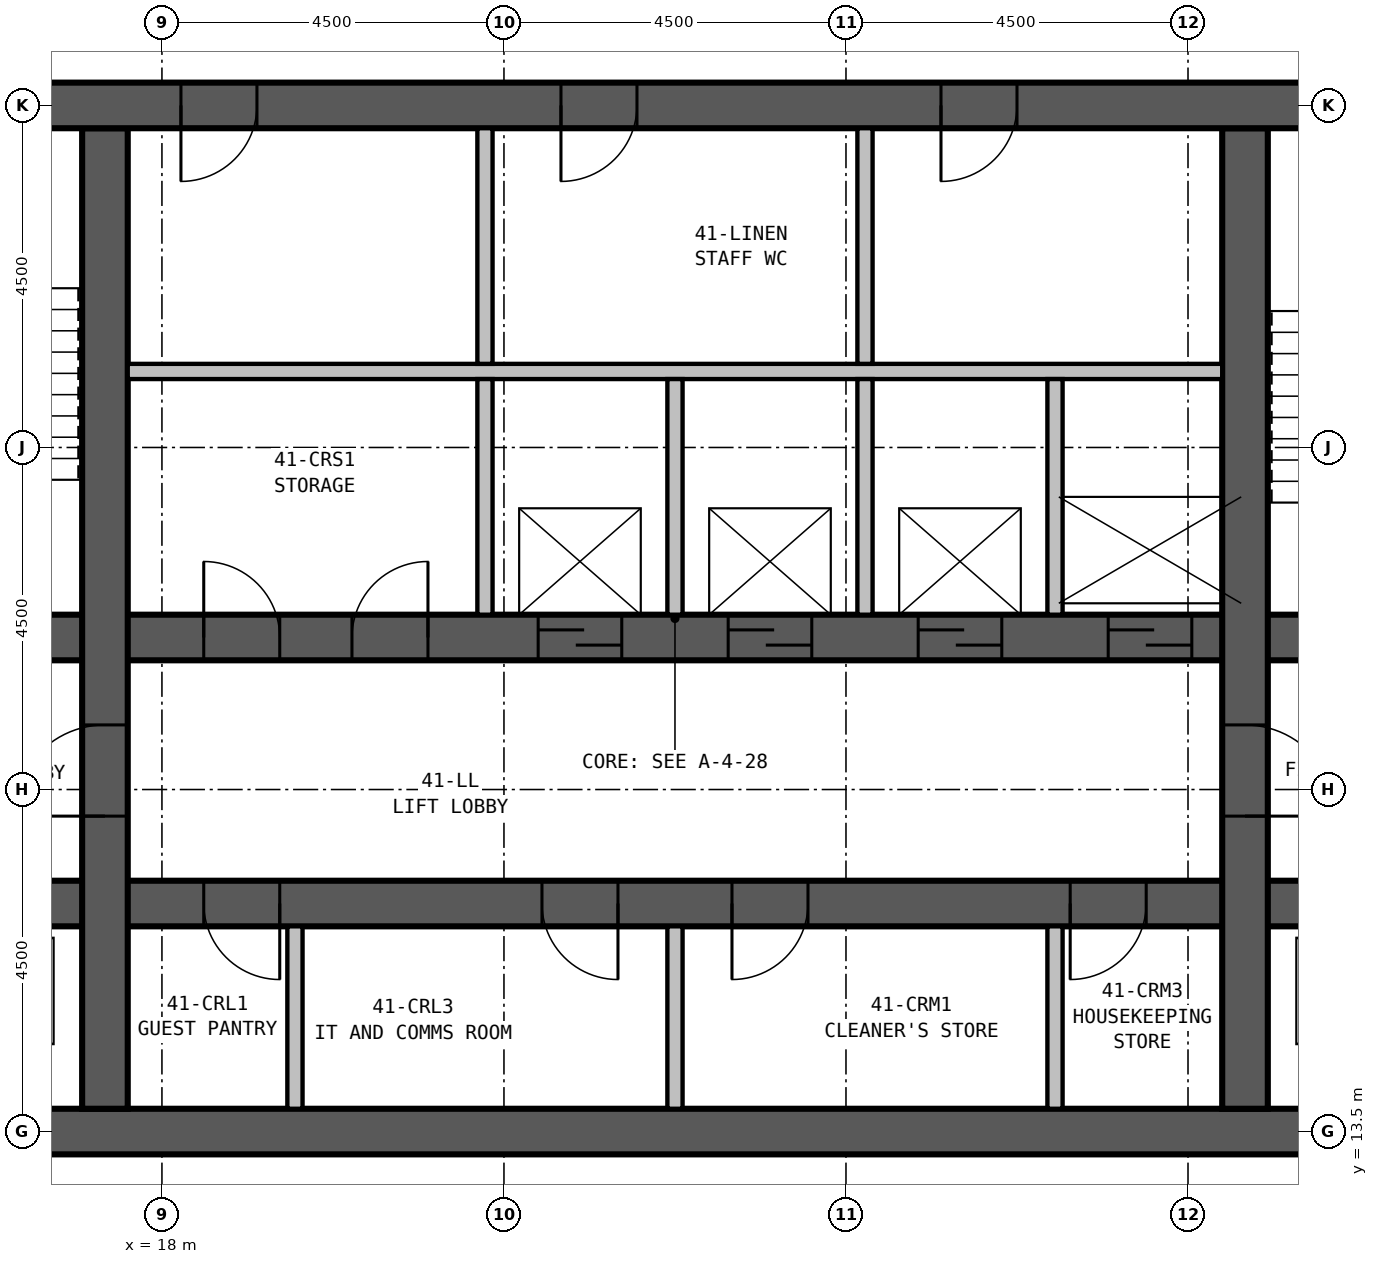
"""IFC4 building model, lengths in metres.
Left out: names, types, materials, properties, quantities, classifications, styles, units other than length and angle.
Written with IfcOpenShell. Run it as: python <this file> out.ifc"""

import sys

from ifc_helpers import new_model, si_unit, direction, frame, frame_2d, origin, place, context, subcontext, project, spatial, rectangle, extrude, element, fill, save


model = new_model("IFC4")
c1 = context("Model", 3, precision=1e-05, world=origin(), true_north=direction((0.0, 1.0)))
c2 = subcontext(c1, "Body", "Model", "MODEL_VIEW")
j1 = project(units=[si_unit("LENGTHUNIT", "METRE"), si_unit("PLANEANGLEUNIT", "RADIAN")], contexts=[c1])
p1 = place(None, origin())
s1 = spatial("IfcSite", under=j1, at=p1, CompositionType="ELEMENT")
p2 = place(p1, origin())
s2 = spatial("IfcBuilding", under=s1, at=p2, CompositionType="ELEMENT")
p3 = place(p2, frame((0.0, 0.0, 162.4)))
s3 = spatial("IfcBuildingStorey", under=s2, at=p3, CompositionType="ELEMENT", Elevation=162.4)
p4 = place(p3, frame((13.2, 13.5, 0.0), z_axis=(0.0, 0.0, 1.0), x_axis=(1.0, 0.0, 0.0)))
e1 = element("IfcWall", 1, at=p4, inside=s3, PredefinedType="SHEAR", context=c2, shape_type="SweptSolid", body=[
    extrude(rectangle(XDim=23.1, YDim=0.6, at=frame_2d((11.55, 0.0))), origin(), (0.0, 0.0, 1.0), 3.5),
])
p5 = place(p3, frame((36.3, 27.0, 0.0), z_axis=(0.0, 0.0, 1.0), x_axis=(-1.0, 0.0, 0.0)))
e2 = element("IfcWall", 2, at=p5, inside=s3, PredefinedType="SHEAR", context=c2, shape_type="SweptSolid", body=[
    extrude(rectangle(XDim=23.1, YDim=0.6, at=frame_2d((11.55, 0.0))), origin(), (0.0, 0.0, 1.0), 3.5),
])
p6 = place(p5, frame((17.05, 0.0, 0.0)))
e3 = element("IfcOpeningElement", 3, at=p6, cuts=e2, PredefinedType="OPENING", context=c2, shape_type="SweptSolid", body=[
    extrude(rectangle(XDim=1.0, YDim=2.1, at=frame_2d((0.5, 1.05))), frame((0.0, 0.31, 0.0), z_axis=(0.0, -1.0, 0.0), x_axis=(1.0, 0.0, 0.0)), (0.0, 0.0, 1.0), 0.62),
])
p7 = place(p5, frame((12.05, 0.0, 0.0)))
e4 = element("IfcOpeningElement", 4, at=p7, cuts=e2, PredefinedType="OPENING", context=c2, shape_type="SweptSolid", body=[
    extrude(rectangle(XDim=1.0, YDim=2.1, at=frame_2d((0.5, 1.05))), frame((0.0, 0.31, 0.0), z_axis=(0.0, -1.0, 0.0), x_axis=(1.0, 0.0, 0.0)), (0.0, 0.0, 1.0), 0.62),
])
p8 = place(p5, frame((7.05, 0.0, 0.0)))
e5 = element("IfcOpeningElement", 5, at=p8, cuts=e2, PredefinedType="OPENING", context=c2, shape_type="SweptSolid", body=[
    extrude(rectangle(XDim=1.0, YDim=2.1, at=frame_2d((0.5, 1.05))), frame((0.0, 0.31, 0.0), z_axis=(0.0, -1.0, 0.0), x_axis=(1.0, 0.0, 0.0)), (0.0, 0.0, 1.0), 0.62),
])
p9 = place(p3, frame((17.25, 13.8, 0.0), z_axis=(0.0, 0.0, 1.0), x_axis=(0.0, 1.0, 0.0)))
e6 = element("IfcWall", 6, at=p9, inside=s3, PredefinedType="SHEAR", context=c2, shape_type="SweptSolid", body=[
    extrude(rectangle(XDim=12.9, YDim=0.6, at=frame_2d((6.45, 0.0))), origin(), (0.0, 0.0, 1.0), 3.5),
])
p10 = place(p9, frame((3.85, 0.0, 0.0)))
e7 = element("IfcOpeningElement", 7, at=p10, cuts=e6, PredefinedType="OPENING", context=c2, shape_type="SweptSolid", body=[
    extrude(rectangle(XDim=1.2, YDim=2.1, at=frame_2d((0.6, 1.05))), frame((0.0, 0.31, 0.0), z_axis=(0.0, -1.0, 0.0), x_axis=(1.0, 0.0, 0.0)), (0.0, 0.0, 1.0), 0.62),
])
p11 = place(p3, frame((32.25, 13.8, 0.0), z_axis=(0.0, 0.0, 1.0), x_axis=(0.0, 1.0, 0.0)))
e8 = element("IfcWall", 8, at=p11, inside=s3, PredefinedType="SHEAR", context=c2, shape_type="SweptSolid", body=[
    extrude(rectangle(XDim=12.9, YDim=0.6, at=frame_2d((6.45, 0.0))), origin(), (0.0, 0.0, 1.0), 3.5),
])
p12 = place(p11, frame((5.05, 0.0, 0.0), z_axis=(0.0, 0.0, 1.0), x_axis=(-1.0, 0.0, 0.0)))
e9 = element("IfcOpeningElement", 9, at=p12, cuts=e8, PredefinedType="OPENING", context=c2, shape_type="SweptSolid", body=[
    extrude(rectangle(XDim=1.2, YDim=2.1, at=frame_2d((0.6, 1.05))), frame((0.0, 0.31, 0.0), z_axis=(0.0, -1.0, 0.0), x_axis=(1.0, 0.0, 0.0)), (0.0, 0.0, 1.0), 0.62),
])
p13 = place(p3, frame((13.8, 16.5, 0.0), z_axis=(0.0, 0.0, 1.0), x_axis=(1.0, 0.0, 0.0)))
e10 = element("IfcWall", 10, at=p13, inside=s3, PredefinedType="SHEAR", context=c2, shape_type="SweptSolid", body=[
    extrude(rectangle(XDim=21.9, YDim=0.6, at=frame_2d((10.95, 0.0))), origin(), (0.0, 0.0, 1.0), 3.5),
])
p14 = place(p13, frame((5.75, 0.0, 0.0), z_axis=(0.0, 0.0, 1.0), x_axis=(-1.0, 0.0, 0.0)))
e11 = element("IfcOpeningElement", 11, at=p14, cuts=e10, PredefinedType="OPENING", context=c2, shape_type="SweptSolid", body=[
    extrude(rectangle(XDim=1.0, YDim=2.1, at=frame_2d((0.5, 1.05))), frame((0.0, 0.31, 0.0), z_axis=(0.0, -1.0, 0.0), x_axis=(1.0, 0.0, 0.0)), (0.0, 0.0, 1.0), 0.62),
])
p15 = place(p13, frame((10.2, 0.0, 0.0), z_axis=(0.0, 0.0, 1.0), x_axis=(-1.0, 0.0, 0.0)))
e12 = element("IfcOpeningElement", 12, at=p15, cuts=e10, PredefinedType="OPENING", context=c2, shape_type="SweptSolid", body=[
    extrude(rectangle(XDim=1.0, YDim=2.1, at=frame_2d((0.5, 1.05))), frame((0.0, 0.31, 0.0), z_axis=(0.0, -1.0, 0.0), x_axis=(1.0, 0.0, 0.0)), (0.0, 0.0, 1.0), 0.62),
])
p16 = place(p13, frame((12.7, 0.0, 0.0), z_axis=(0.0, 0.0, 1.0), x_axis=(-1.0, 0.0, 0.0)))
e13 = element("IfcOpeningElement", 13, at=p16, cuts=e10, PredefinedType="OPENING", context=c2, shape_type="SweptSolid", body=[
    extrude(rectangle(XDim=1.0, YDim=2.1, at=frame_2d((0.5, 1.05))), frame((0.0, 0.31, 0.0), z_axis=(0.0, -1.0, 0.0), x_axis=(1.0, 0.0, 0.0)), (0.0, 0.0, 1.0), 0.62),
])
p17 = place(p13, frame((17.15, 0.0, 0.0), z_axis=(0.0, 0.0, 1.0), x_axis=(-1.0, 0.0, 0.0)))
e14 = element("IfcOpeningElement", 14, at=p17, cuts=e10, PredefinedType="OPENING", context=c2, shape_type="SweptSolid", body=[
    extrude(rectangle(XDim=1.0, YDim=2.1, at=frame_2d((0.5, 1.05))), frame((0.0, 0.31, 0.0), z_axis=(0.0, -1.0, 0.0), x_axis=(1.0, 0.0, 0.0)), (0.0, 0.0, 1.0), 0.62),
])
p18 = place(p13, frame((0.6, 0.0, 0.0)))
e15 = element("IfcOpeningElement", 15, at=p18, cuts=e10, PredefinedType="OPENING", context=c2, shape_type="SweptSolid", body=[
    extrude(rectangle(XDim=1.2, YDim=2.1, at=frame_2d((0.6, 1.05))), frame((0.0, 0.31, 0.0), z_axis=(0.0, -1.0, 0.0), x_axis=(1.0, 0.0, 0.0)), (0.0, 0.0, 1.0), 0.62),
])
p19 = place(p13, frame((19.6, 0.0, 0.0)))
e16 = element("IfcOpeningElement", 16, at=p19, cuts=e10, PredefinedType="OPENING", context=c2, shape_type="SweptSolid", body=[
    extrude(rectangle(XDim=1.2, YDim=2.1, at=frame_2d((0.6, 1.05))), frame((0.0, 0.31, 0.0), z_axis=(0.0, -1.0, 0.0), x_axis=(1.0, 0.0, 0.0)), (0.0, 0.0, 1.0), 0.62),
])
p20 = place(p3, frame((13.8, 20.0, 0.0), z_axis=(0.0, 0.0, 1.0), x_axis=(1.0, 0.0, 0.0)))
e17 = element("IfcWall", 17, at=p20, inside=s3, PredefinedType="SHEAR", context=c2, shape_type="SweptSolid", body=[
    extrude(rectangle(XDim=21.9, YDim=0.6, at=frame_2d((10.95, 0.0))), origin(), (0.0, 0.0, 1.0), 3.5),
])
p21 = place(p20, frame((0.5, 0.0, 0.0)))
e18 = element("IfcOpeningElement", 18, at=p21, cuts=e17, PredefinedType="OPENING", context=c2, shape_type="SweptSolid", body=[
    extrude(rectangle(XDim=1.0, YDim=2.1, at=frame_2d((0.5, 1.05))), frame((0.0, 0.31, 0.0), z_axis=(0.0, -1.0, 0.0), x_axis=(1.0, 0.0, 0.0)), (0.0, 0.0, 1.0), 0.62),
])
p22 = place(p20, frame((20.5, 0.0, 0.0)))
e19 = element("IfcOpeningElement", 19, at=p22, cuts=e17, PredefinedType="OPENING", context=c2, shape_type="SweptSolid", body=[
    extrude(rectangle(XDim=1.0, YDim=2.1, at=frame_2d((0.5, 1.05))), frame((0.0, 0.31, 0.0), z_axis=(0.0, -1.0, 0.0), x_axis=(1.0, 0.0, 0.0)), (0.0, 0.0, 1.0), 0.62),
])
p23 = place(p20, frame((9.15, 0.0, 0.0)))
e20 = element("IfcOpeningElement", 20, at=p23, cuts=e17, PredefinedType="OPENING", context=c2, shape_type="SweptSolid", body=[
    extrude(rectangle(XDim=1.1, YDim=2.1, at=frame_2d((0.55, 1.05))), frame((0.0, 0.31, 0.0), z_axis=(0.0, -1.0, 0.0), x_axis=(1.0, 0.0, 0.0)), (0.0, 0.0, 1.0), 0.62),
])
p24 = place(p20, frame((11.65, 0.0, 0.0)))
e21 = element("IfcOpeningElement", 21, at=p24, cuts=e17, PredefinedType="OPENING", context=c2, shape_type="SweptSolid", body=[
    extrude(rectangle(XDim=1.1, YDim=2.1, at=frame_2d((0.55, 1.05))), frame((0.0, 0.31, 0.0), z_axis=(0.0, -1.0, 0.0), x_axis=(1.0, 0.0, 0.0)), (0.0, 0.0, 1.0), 0.62),
])
p25 = place(p20, frame((14.15, 0.0, 0.0)))
e22 = element("IfcOpeningElement", 22, at=p25, cuts=e17, PredefinedType="OPENING", context=c2, shape_type="SweptSolid", body=[
    extrude(rectangle(XDim=1.1, YDim=2.1, at=frame_2d((0.55, 1.05))), frame((0.0, 0.31, 0.0), z_axis=(0.0, -1.0, 0.0), x_axis=(1.0, 0.0, 0.0)), (0.0, 0.0, 1.0), 0.62),
])
p26 = place(p20, frame((16.65, 0.0, 0.0)))
e23 = element("IfcOpeningElement", 23, at=p26, cuts=e17, PredefinedType="OPENING", context=c2, shape_type="SweptSolid", body=[
    extrude(rectangle(XDim=1.1, YDim=2.1, at=frame_2d((0.55, 1.05))), frame((0.0, 0.31, 0.0), z_axis=(0.0, -1.0, 0.0), x_axis=(1.0, 0.0, 0.0)), (0.0, 0.0, 1.0), 0.62),
])
p27 = place(p20, frame((4.75, 0.0, 0.0)))
e24 = element("IfcOpeningElement", 24, at=p27, cuts=e17, PredefinedType="OPENING", context=c2, shape_type="SweptSolid", body=[
    extrude(rectangle(XDim=1.0, YDim=2.1, at=frame_2d((0.5, 1.05))), frame((0.0, 0.31, 0.0), z_axis=(0.0, -1.0, 0.0), x_axis=(1.0, 0.0, 0.0)), (0.0, 0.0, 1.0), 0.62),
])
p28 = place(p20, frame((6.7, 0.0, 0.0)))
e25 = element("IfcOpeningElement", 25, at=p28, cuts=e17, PredefinedType="OPENING", context=c2, shape_type="SweptSolid", body=[
    extrude(rectangle(XDim=1.0, YDim=2.1, at=frame_2d((0.5, 1.05))), frame((0.0, 0.31, 0.0), z_axis=(0.0, -1.0, 0.0), x_axis=(1.0, 0.0, 0.0)), (0.0, 0.0, 1.0), 0.62),
])
p29 = place(p3, frame((19.75, 13.8, 0.0), z_axis=(0.0, 0.0, 1.0), x_axis=(0.0, 1.0, 0.0)))
e26 = element("IfcWall", 26, at=p29, inside=s3, PredefinedType="PARTITIONING", context=c2, shape_type="SweptSolid", body=[
    extrude(rectangle(XDim=2.4, YDim=0.2, at=frame_2d((1.2, 0.0))), origin(), (0.0, 0.0, 1.0), 3.25),
])
p30 = place(p3, frame((22.25, 20.3, 0.0), z_axis=(0.0, 0.0, 1.0), x_axis=(0.0, 1.0, 0.0)))
e27 = element("IfcWall", 27, at=p30, inside=s3, PredefinedType="PARTITIONING", context=c2, shape_type="SweptSolid", body=[
    extrude(rectangle(XDim=3.1, YDim=0.2, at=frame_2d((1.55, 0.0))), origin(), (0.0, 0.0, 1.0), 3.25),
])
p31 = place(p3, frame((24.75, 13.8, 0.0), z_axis=(0.0, 0.0, 1.0), x_axis=(0.0, 1.0, 0.0)))
e28 = element("IfcWall", 28, at=p31, inside=s3, PredefinedType="PARTITIONING", context=c2, shape_type="SweptSolid", body=[
    extrude(rectangle(XDim=2.4, YDim=0.2, at=frame_2d((1.2, 0.0))), origin(), (0.0, 0.0, 1.0), 3.25),
])
for number, where, z_axis, x_axis in (
    (29, (24.75, 20.3, 0.0), (0.0, 0.0, 1.0), (0.0, 1.0, 0.0)),
    (30, (27.25, 20.3, 0.0), (0.0, 0.0, 1.0), (0.0, 1.0, 0.0)),
):
    element("IfcWall", number, at=place(p3, frame(where, z_axis=z_axis, x_axis=x_axis)), inside=s3, PredefinedType="PARTITIONING", context=c2, shape_type="SweptSolid", body=[
        extrude(rectangle(XDim=3.1, YDim=0.2, at=frame_2d((1.55, 0.0))), origin(), (0.0, 0.0, 1.0), 3.25),
    ])
p32 = place(p3, frame((29.75, 13.8, 0.0), z_axis=(0.0, 0.0, 1.0), x_axis=(0.0, 1.0, 0.0)))
e31 = element("IfcWall", 31, at=p32, inside=s3, PredefinedType="PARTITIONING", context=c2, shape_type="SweptSolid", body=[
    extrude(rectangle(XDim=2.4, YDim=0.2, at=frame_2d((1.2, 0.0))), origin(), (0.0, 0.0, 1.0), 3.25),
])
p33 = place(p3, frame((29.75, 20.3, 0.0), z_axis=(0.0, 0.0, 1.0), x_axis=(0.0, 1.0, 0.0)))
e32 = element("IfcWall", 32, at=p33, inside=s3, PredefinedType="PARTITIONING", context=c2, shape_type="SweptSolid", body=[
    extrude(rectangle(XDim=3.1, YDim=0.2, at=frame_2d((1.55, 0.0))), origin(), (0.0, 0.0, 1.0), 3.25),
])
p34 = place(p3, frame((17.55, 23.5, 0.0), z_axis=(0.0, 0.0, 1.0), x_axis=(1.0, 0.0, 0.0)))
e33 = element("IfcWall", 33, at=p34, inside=s3, PredefinedType="PARTITIONING", context=c2, shape_type="SweptSolid", body=[
    extrude(rectangle(XDim=14.4, YDim=0.2, at=frame_2d((7.2, 0.0))), origin(), (0.0, 0.0, 1.0), 3.25),
])
for number, where, z_axis, x_axis in (
    (34, (22.25, 23.6, 0.0), (0.0, 0.0, 1.0), (0.0, 1.0, 0.0)),
    (35, (27.25, 23.6, 0.0), (0.0, 0.0, 1.0), (0.0, 1.0, 0.0)),
):
    element("IfcWall", number, at=place(p3, frame(where, z_axis=z_axis, x_axis=x_axis)), inside=s3, PredefinedType="PARTITIONING", context=c2, shape_type="SweptSolid", body=[
        extrude(rectangle(XDim=3.1, YDim=0.2, at=frame_2d((1.55, 0.0))), origin(), (0.0, 0.0, 1.0), 3.25),
    ])
p35 = place(p10, origin())
e36 = element("IfcDoor", 36, at=p35, inside=s3, OperationType="SINGLE_SWING_LEFT", PredefinedType="DOOR", context=c2, shape_type="SweptSolid", body=[
    extrude(rectangle(XDim=1.2, YDim=2.1, at=frame_2d((0.6, 1.05))), frame((0.0, 0.3, 0.0), z_axis=(0.0, -1.0, 0.0), x_axis=(1.0, 0.0, 0.0)), (0.0, 0.0, 1.0), 0.6),
])
fill(e7, e36)
p36 = place(p12, origin())
e37 = element("IfcDoor", 37, at=p36, inside=s3, OperationType="SINGLE_SWING_RIGHT", PredefinedType="DOOR", context=c2, shape_type="SweptSolid", body=[
    extrude(rectangle(XDim=1.2, YDim=2.1, at=frame_2d((0.6, 1.05))), frame((0.0, 0.3, 0.0), z_axis=(0.0, -1.0, 0.0), x_axis=(1.0, 0.0, 0.0)), (0.0, 0.0, 1.0), 0.6),
])
fill(e9, e37)
p37 = place(p23, origin())
e38 = element("IfcDoor", 38, at=p37, inside=s3, OperationType="SLIDING_TO_LEFT", PredefinedType="DOOR", context=c2, shape_type="SweptSolid", body=[
    extrude(rectangle(XDim=1.1, YDim=2.1, at=frame_2d((0.55, 1.05))), frame((0.0, 0.3, 0.0), z_axis=(0.0, -1.0, 0.0), x_axis=(1.0, 0.0, 0.0)), (0.0, 0.0, 1.0), 0.6),
])
fill(e20, e38)
p38 = place(p24, origin())
e39 = element("IfcDoor", 39, at=p38, inside=s3, OperationType="SLIDING_TO_LEFT", PredefinedType="DOOR", context=c2, shape_type="SweptSolid", body=[
    extrude(rectangle(XDim=1.1, YDim=2.1, at=frame_2d((0.55, 1.05))), frame((0.0, 0.3, 0.0), z_axis=(0.0, -1.0, 0.0), x_axis=(1.0, 0.0, 0.0)), (0.0, 0.0, 1.0), 0.6),
])
fill(e21, e39)
p39 = place(p25, origin())
e40 = element("IfcDoor", 40, at=p39, inside=s3, OperationType="SLIDING_TO_LEFT", PredefinedType="DOOR", context=c2, shape_type="SweptSolid", body=[
    extrude(rectangle(XDim=1.1, YDim=2.1, at=frame_2d((0.55, 1.05))), frame((0.0, 0.3, 0.0), z_axis=(0.0, -1.0, 0.0), x_axis=(1.0, 0.0, 0.0)), (0.0, 0.0, 1.0), 0.6),
])
fill(e22, e40)
p40 = place(p26, origin())
e41 = element("IfcDoor", 41, at=p40, inside=s3, OperationType="SLIDING_TO_LEFT", PredefinedType="DOOR", context=c2, shape_type="SweptSolid", body=[
    extrude(rectangle(XDim=1.1, YDim=2.1, at=frame_2d((0.55, 1.05))), frame((0.0, 0.3, 0.0), z_axis=(0.0, -1.0, 0.0), x_axis=(1.0, 0.0, 0.0)), (0.0, 0.0, 1.0), 0.6),
])
fill(e23, e41)
p41 = place(p14, origin())
e42 = element("IfcDoor", 42, at=p41, inside=s3, OperationType="SINGLE_SWING_LEFT", PredefinedType="DOOR", context=c2, shape_type="SweptSolid", body=[
    extrude(rectangle(XDim=1.0, YDim=2.1, at=frame_2d((0.5, 1.05))), frame((0.0, 0.3, 0.0), z_axis=(0.0, -1.0, 0.0), x_axis=(1.0, 0.0, 0.0)), (0.0, 0.0, 1.0), 0.6),
])
fill(e11, e42)
p42 = place(p15, origin())
e43 = element("IfcDoor", 43, at=p42, inside=s3, OperationType="SINGLE_SWING_LEFT", PredefinedType="DOOR", context=c2, shape_type="SweptSolid", body=[
    extrude(rectangle(XDim=1.0, YDim=2.1, at=frame_2d((0.5, 1.05))), frame((0.0, 0.3, 0.0), z_axis=(0.0, -1.0, 0.0), x_axis=(1.0, 0.0, 0.0)), (0.0, 0.0, 1.0), 0.6),
])
fill(e12, e43)
p43 = place(p16, origin())
e44 = element("IfcDoor", 44, at=p43, inside=s3, OperationType="SINGLE_SWING_RIGHT", PredefinedType="DOOR", context=c2, shape_type="SweptSolid", body=[
    extrude(rectangle(XDim=1.0, YDim=2.1, at=frame_2d((0.5, 1.05))), frame((0.0, 0.3, 0.0), z_axis=(0.0, -1.0, 0.0), x_axis=(1.0, 0.0, 0.0)), (0.0, 0.0, 1.0), 0.6),
])
fill(e13, e44)
p44 = place(p17, origin())
e45 = element("IfcDoor", 45, at=p44, inside=s3, OperationType="SINGLE_SWING_RIGHT", PredefinedType="DOOR", context=c2, shape_type="SweptSolid", body=[
    extrude(rectangle(XDim=1.0, YDim=2.1, at=frame_2d((0.5, 1.05))), frame((0.0, 0.3, 0.0), z_axis=(0.0, -1.0, 0.0), x_axis=(1.0, 0.0, 0.0)), (0.0, 0.0, 1.0), 0.6),
])
fill(e14, e45)
p45 = place(p27, origin())
e46 = element("IfcDoor", 46, at=p45, inside=s3, OperationType="SINGLE_SWING_LEFT", PredefinedType="DOOR", context=c2, shape_type="SweptSolid", body=[
    extrude(rectangle(XDim=1.0, YDim=2.1, at=frame_2d((0.5, 1.05))), frame((0.0, 0.3, 0.0), z_axis=(0.0, -1.0, 0.0), x_axis=(1.0, 0.0, 0.0)), (0.0, 0.0, 1.0), 0.6),
])
fill(e24, e46)
p46 = place(p28, origin())
e47 = element("IfcDoor", 47, at=p46, inside=s3, OperationType="SINGLE_SWING_RIGHT", PredefinedType="DOOR", context=c2, shape_type="SweptSolid", body=[
    extrude(rectangle(XDim=1.0, YDim=2.1, at=frame_2d((0.5, 1.05))), frame((0.0, 0.3, 0.0), z_axis=(0.0, -1.0, 0.0), x_axis=(1.0, 0.0, 0.0)), (0.0, 0.0, 1.0), 0.6),
])
fill(e25, e47)
p47 = place(p6, origin())
e48 = element("IfcDoor", 48, at=p47, inside=s3, OperationType="SINGLE_SWING_RIGHT", PredefinedType="DOOR", context=c2, shape_type="SweptSolid", body=[
    extrude(rectangle(XDim=1.0, YDim=2.1, at=frame_2d((0.5, 1.05))), frame((0.0, 0.3, 0.0), z_axis=(0.0, -1.0, 0.0), x_axis=(1.0, 0.0, 0.0)), (0.0, 0.0, 1.0), 0.6),
])
fill(e3, e48)
p48 = place(p7, origin())
e49 = element("IfcDoor", 49, at=p48, inside=s3, OperationType="SINGLE_SWING_RIGHT", PredefinedType="DOOR", context=c2, shape_type="SweptSolid", body=[
    extrude(rectangle(XDim=1.0, YDim=2.1, at=frame_2d((0.5, 1.05))), frame((0.0, 0.3, 0.0), z_axis=(0.0, -1.0, 0.0), x_axis=(1.0, 0.0, 0.0)), (0.0, 0.0, 1.0), 0.6),
])
fill(e4, e49)
p49 = place(p8, origin())
e50 = element("IfcDoor", 50, at=p49, inside=s3, OperationType="SINGLE_SWING_RIGHT", PredefinedType="DOOR", context=c2, shape_type="SweptSolid", body=[
    extrude(rectangle(XDim=1.0, YDim=2.1, at=frame_2d((0.5, 1.05))), frame((0.0, 0.3, 0.0), z_axis=(0.0, -1.0, 0.0), x_axis=(1.0, 0.0, 0.0)), (0.0, 0.0, 1.0), 0.6),
])
fill(e5, e50)
save(model, sys.argv[1])
